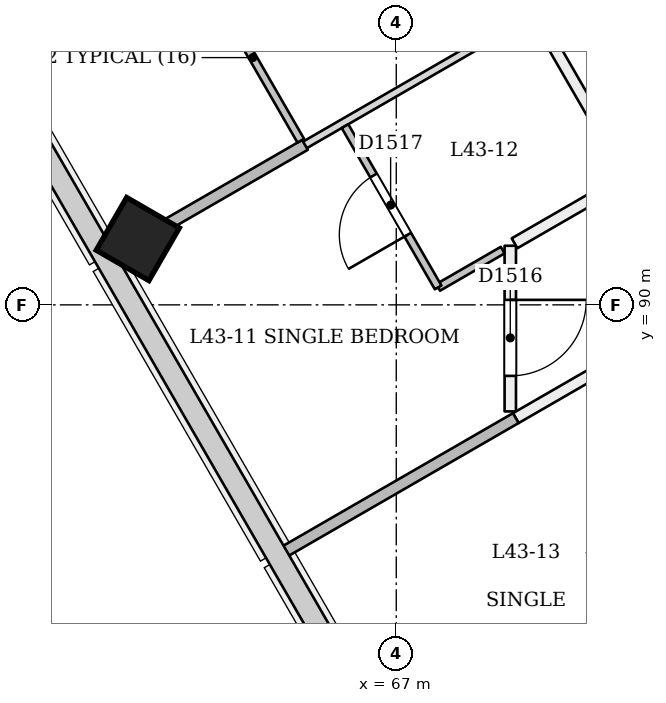
"""IFC4 building model, lengths in metres.
Left out: names, types, materials, properties, quantities, classifications, styles, units other than length and angle.
Written with IfcOpenShell. Run it as: python <this file> out.ifc"""

import sys

from ifc_helpers import new_model, si_unit, direction, frame, frame_2d, origin, origin_2d, place, context, subcontext, project, spatial, rectangle, extrude, element, fill, save


model = new_model("IFC4")
c1 = context("Model", 3, precision=1e-05, world=origin(), true_north=direction((0.0, 1.0)))
c2 = subcontext(c1, "Body", "Model", "MODEL_VIEW")
j1 = project(units=[si_unit("LENGTHUNIT", "METRE"), si_unit("PLANEANGLEUNIT", "RADIAN")], contexts=[c1])
p1 = place(None, origin())
s1 = spatial("IfcSite", under=j1, at=p1, CompositionType="ELEMENT")
p2 = place(p1, origin())
s2 = spatial("IfcBuilding", under=s1, at=p2, CompositionType="ELEMENT")
p3 = place(p2, frame((0.0, 0.0, 167.4)))
s3 = spatial("IfcBuildingStorey", under=s2, at=p3, CompositionType="ELEMENT", Elevation=167.4)
p4 = place(p3, frame((63.572, 90.819, -0.024), z_axis=(0.02222134892, 0.038480872521, 0.999012229206), x_axis=(-0.865642081321, -0.499182199018, 0.038482713395)))
e1 = element("IfcColumn", 1, at=p4, inside=s3, PredefinedType="COLUMN", context=c2, shape_type="SweptSolid", body=[
    extrude(rectangle(XDim=0.8, YDim=0.8, at=origin_2d()), origin(), (0.0, 0.0, 1.0), 3.604),
])
p5 = place(p3, frame((66.562, 97.742, 0.0), z_axis=(0.0, 0.0, 1.0), x_axis=(0.500010275428, -0.866019471182, 0.0)))
e2 = element("IfcWall", 2, at=p5, inside=s3, PredefinedType="PARTITIONING", context=c2, shape_type="SweptSolid", body=[
    extrude(rectangle(XDim=7.0, YDim=0.15, at=frame_2d((3.5, 0.0))), origin(), (0.0, 0.0, 1.0), 2.75),
])
p6 = place(p5, frame((0.571, 0.0, 0.0)))
e3 = element("IfcOpeningElement", 3, at=p6, cuts=e2, PredefinedType="OPENING", context=c2, shape_type="SweptSolid", body=[
    extrude(rectangle(XDim=1.1, YDim=2.1, at=frame_2d((0.55, 1.05))), frame((0.0, 0.085, 0.0), z_axis=(0.0, -1.0, 0.0), x_axis=(1.0, 0.0, 0.0)), (0.0, 0.0, 1.0), 0.171),
])
p7 = place(p3, frame((68.5, 90.778, 0.0), z_axis=(0.0, 0.0, 1.0), x_axis=(0.0, -1.0, 0.0)))
e4 = element("IfcWall", 4, at=p7, inside=s3, PredefinedType="PARTITIONING", context=c2, shape_type="SweptSolid", body=[
    extrude(rectangle(XDim=2.179, YDim=0.15, at=frame_2d((1.09, 0.0))), origin(), (0.0, 0.0, 1.0), 3.15),
])
p8 = place(p7, frame((0.712, 0.0, 0.0)))
e5 = element("IfcOpeningElement", 5, at=p8, cuts=e4, PredefinedType="OPENING", context=c2, shape_type="SweptSolid", body=[
    extrude(rectangle(XDim=1.0, YDim=2.1, at=frame_2d((0.5, 1.05))), frame((0.0, 0.085, 0.0), z_axis=(0.0, -1.0, 0.0), x_axis=(1.0, 0.0, 0.0)), (0.0, 0.0, 1.0), 0.171),
])
p9 = place(p3, frame((69.997, 91.642, 0.0), z_axis=(0.0, 0.0, 1.0), x_axis=(-0.866031670005, -0.49998914643, 0.0)))
e6 = element("IfcWall", 6, at=p9, inside=s3, PredefinedType="PARTITIONING", context=c2, shape_type="SweptSolid", body=[
    extrude(rectangle(XDim=1.664, YDim=0.15, at=frame_2d((0.832, 0.0))), origin(), (0.0, 0.0, 1.0), 3.15),
])
p10 = place(p3, frame((68.572, 88.51, 0.0), z_axis=(0.0, 0.0, 1.0), x_axis=(0.866056369097, 0.49994636267, 0.0)))
e7 = element("IfcWall", 7, at=p10, inside=s3, PredefinedType="PARTITIONING", context=c2, shape_type="SweptSolid", body=[
    extrude(rectangle(XDim=2.8, YDim=0.15, at=frame_2d((1.4, 0.0))), origin(), (0.0, 0.0, 1.0), 3.15),
])
p11 = place(p3, frame((65.744, 92.16, 0.0), z_axis=(0.0, 0.0, 1.0), x_axis=(-0.50001820224, 0.866014894461, 0.0)))
e8 = element("IfcWall", 8, at=p11, inside=s3, PredefinedType="PARTITIONING", context=c2, shape_type="SweptSolid", body=[
    extrude(rectangle(XDim=2.525, YDim=0.1, at=frame_2d((1.262, 0.0))), origin(), (0.0, 0.0, 1.0), 2.75),
])
p12 = place(p3, frame((63.27, 90.645, 0.0), z_axis=(0.0, 0.0, 1.0), x_axis=(0.865975318022, 0.500086741053, 0.0)))
e9 = element("IfcWall", 9, at=p12, inside=s3, PredefinedType="PARTITIONING", context=c2, shape_type="SweptSolid", body=[
    extrude(rectangle(XDim=2.92, YDim=0.15, at=frame_2d((1.46, 0.0))), origin(), (0.0, 0.0, 1.0), 2.65),
])
p13 = place(p3, frame((65.764, 92.085, 0.0), z_axis=(0.0, 0.0, 1.0), x_axis=(0.866032163869, 0.499988291006, 0.0)))
e10 = element("IfcWall", 10, at=p13, inside=s3, PredefinedType="PARTITIONING", context=c2, shape_type="SweptSolid", body=[
    extrude(rectangle(XDim=3.445, YDim=0.1, at=frame_2d((1.722, 0.0))), origin(), (0.0, 0.0, 1.0), 2.75),
])
p14 = place(p3, frame((68.4, 90.72, 0.0), z_axis=(0.0, 0.0, 1.0), x_axis=(-0.865920189979, -0.500182191394, 0.0)))
e11 = element("IfcWall", 11, at=p14, inside=s3, PredefinedType="PARTITIONING", context=c2, shape_type="SweptSolid", body=[
    extrude(rectangle(XDim=0.981, YDim=0.1, at=frame_2d((0.49, 0.0))), origin(), (0.0, 0.0, 1.0), 3.15),
])
p15 = place(p3, frame((67.551, 90.229, 0.0), z_axis=(0.0, 0.0, 1.0), x_axis=(-0.500018594424, 0.866014668023, 0.0)))
e12 = element("IfcWall", 12, at=p15, inside=s3, PredefinedType="PARTITIONING", context=c2, shape_type="SweptSolid", body=[
    extrude(rectangle(XDim=2.45, YDim=0.1, at=frame_2d((1.225, 0.0))), origin(), (0.0, 0.0, 1.0), 2.75),
])
p16 = place(p15, frame((0.8, 0.0, 0.0)))
e13 = element("IfcOpeningElement", 13, at=p16, cuts=e12, PredefinedType="OPENING", context=c2, shape_type="SweptSolid", body=[
    extrude(rectangle(XDim=0.9, YDim=2.1, at=frame_2d((0.45, 1.05))), frame((0.0, 0.061, 0.0), z_axis=(0.0, -1.0, 0.0), x_axis=(1.0, 0.0, 0.0)), (0.0, 0.0, 1.0), 0.121),
])
p17 = place(p3, frame((65.502, 86.737, 0.0), z_axis=(0.0, 0.0, 1.0), x_axis=(0.866000939276, 0.500042371378, 0.0)))
e14 = element("IfcWall", 14, at=p17, inside=s3, PredefinedType="PARTITIONING", context=c2, shape_type="SweptSolid", body=[
    extrude(rectangle(XDim=3.545, YDim=0.15, at=frame_2d((1.772, 0.0))), origin(), (0.0, 0.0, 1.0), 2.65),
])
p18 = place(p8, origin())
e15 = element("IfcDoor", 15, at=p18, inside=s3, OperationType="SINGLE_SWING_LEFT", PredefinedType="NOTDEFINED", context=c2, shape_type="SweptSolid", body=[
    extrude(rectangle(XDim=1.0, YDim=2.1, at=frame_2d((0.5, 1.05))), frame((0.0, 0.025, 0.0), z_axis=(0.0, -1.0, 0.0), x_axis=(1.0, 0.0, 0.0)), (0.0, 0.0, 1.0), 0.05),
])
fill(e5, e15)
p19 = place(p16, origin())
e16 = element("IfcDoor", 16, at=p19, inside=s3, OperationType="SINGLE_SWING_LEFT", PredefinedType="NOTDEFINED", context=c2, shape_type="SweptSolid", body=[
    extrude(rectangle(XDim=0.9, YDim=2.1, at=frame_2d((0.45, 1.05))), frame((0.0, 0.025, 0.0), z_axis=(0.0, -1.0, 0.0), x_axis=(1.0, 0.0, 0.0)), (0.0, 0.0, 1.0), 0.05),
])
fill(e13, e16)
save(model, sys.argv[1])
